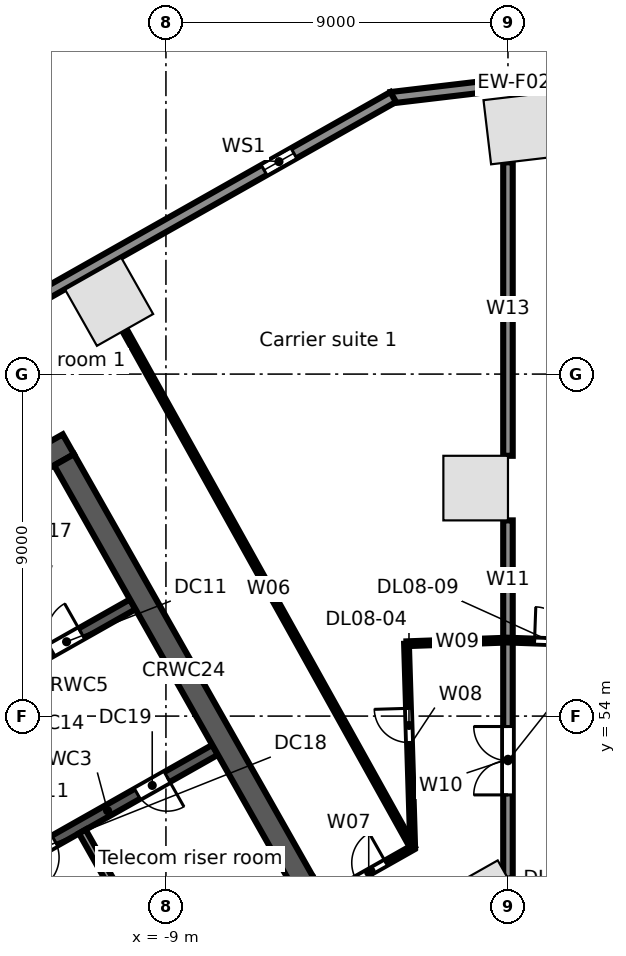
"""IFC4 building model, lengths in metres.
Left out: names, types, materials, properties, quantities, classifications, styles, units other than length and angle.
Written with IfcOpenShell. Run it as: python <this file> out.ifc"""

import sys

from ifc_helpers import new_model, si_unit, direction, frame, frame_2d, origin, origin_2d, place, context, subcontext, project, spatial, rectangle, extrude, element, fill, save


model = new_model("IFC4")
c1 = context("Model", 3, precision=1e-05, world=origin(), true_north=direction((0.0, 1.0)))
c2 = subcontext(c1, "Body", "Model", "MODEL_VIEW")
j1 = project(units=[si_unit("LENGTHUNIT", "METRE"), si_unit("PLANEANGLEUNIT", "RADIAN")], contexts=[c1])
p1 = place(None, origin())
s1 = spatial("IfcSite", under=j1, at=p1, CompositionType="ELEMENT")
p2 = place(p1, origin())
s2 = spatial("IfcBuilding", under=s1, at=p2, CompositionType="ELEMENT")
p3 = place(p2, frame((0.0, 0.0, 51.5)))
s3 = spatial("IfcBuildingStorey", under=s2, at=p3, CompositionType="ELEMENT", Elevation=51.5)
for number, where, z_axis, x_axis in (
    (1, (0.3, 69.464, 0.0), (0.0, 0.0, 1.0), (-0.993, -0.118, 0.0)),
    (2, (-10.495, 64.902, 0.0), (0.0, 0.0, 1.0), (-0.87, -0.492, 0.0)),
    (3, (-0.591, 49.044, 0.0), (0.0, 0.0, 1.0), (0.87, 0.492, 0.0)),
    (4, (-0.85, 60.0, 0.0), (0.0, 0.0, 1.0), (0.0, 1.0, 0.0)),
):
    element("IfcColumn", number, at=place(p3, frame(where, z_axis=z_axis, x_axis=x_axis)), inside=s3, PredefinedType="COLUMN", context=c2, shape_type="SweptSolid", body=[
        extrude(rectangle(XDim=1.7, YDim=1.7, at=origin_2d()), origin(), (0.0, 0.0, 1.0), 5.0),
    ])
p4 = place(p3, frame((-3.076, 70.273, 0.0), z_axis=(0.0, 0.0, 1.0), x_axis=(0.993067743007, 0.117543429416, 0.0)))
e5 = element("IfcWall", 5, at=p4, inside=s3, PredefinedType="STANDARD", context=c2, shape_type="SweptSolid", body=[
    extrude(rectangle(XDim=6.516, YDim=0.3, at=frame_2d((3.258, 0.0))), origin(), (0.0, 0.0, 1.0), 4.68),
])
p5 = place(p3, frame((-58.745, 38.764, 0.0), z_axis=(0.0, 0.0, 1.0), x_axis=(0.870355811726, 0.492423355453, 0.0)))
e6 = element("IfcWall", 6, at=p5, inside=s3, PredefinedType="STANDARD", context=c2, shape_type="SweptSolid", body=[
    extrude(rectangle(XDim=64.025, YDim=0.3, at=frame_2d((32.013, 0.0))), origin(), (0.0, 0.0, 1.0), 4.68),
])
p6 = place(p5, frame((60.122, 0.0, 0.6)))
e7 = element("IfcOpeningElement", 7, at=p6, cuts=e6, PredefinedType="OPENING", context=c2, shape_type="SweptSolid", body=[
    extrude(rectangle(XDim=0.9, YDim=3.2, at=frame_2d((0.45, 1.6))), frame((0.0, 0.16, 0.0), z_axis=(0.0, -1.0, 0.0), x_axis=(1.0, 0.0, 0.0)), (0.0, 0.0, 1.0), 0.32),
])
p7 = place(p5, frame((50.992, 0.0, 0.6)))
e8 = element("IfcOpeningElement", 8, at=p7, cuts=e6, PredefinedType="OPENING", context=c2, shape_type="SweptSolid", body=[
    extrude(rectangle(XDim=0.9, YDim=3.2, at=frame_2d((0.45, 1.6))), frame((0.0, 0.16, 0.0), z_axis=(0.0, -1.0, 0.0), x_axis=(1.0, 0.0, 0.0)), (0.0, 0.0, 1.0), 0.32),
])
p8 = place(p5, frame((41.862, 0.0, 0.6)))
e9 = element("IfcOpeningElement", 9, at=p8, cuts=e6, PredefinedType="OPENING", context=c2, shape_type="SweptSolid", body=[
    extrude(rectangle(XDim=0.9, YDim=3.2, at=frame_2d((0.45, 1.6))), frame((0.0, 0.16, 0.0), z_axis=(0.0, -1.0, 0.0), x_axis=(1.0, 0.0, 0.0)), (0.0, 0.0, 1.0), 0.32),
])
p9 = place(p5, frame((32.732, 0.0, 0.6)))
e10 = element("IfcOpeningElement", 10, at=p9, cuts=e6, PredefinedType="OPENING", context=c2, shape_type="SweptSolid", body=[
    extrude(rectangle(XDim=0.9, YDim=3.2, at=frame_2d((0.45, 1.6))), frame((0.0, 0.16, 0.0), z_axis=(0.0, -1.0, 0.0), x_axis=(1.0, 0.0, 0.0)), (0.0, 0.0, 1.0), 0.32),
])
p10 = place(p5, frame((23.602, 0.0, 0.6)))
e11 = element("IfcOpeningElement", 11, at=p10, cuts=e6, PredefinedType="OPENING", context=c2, shape_type="SweptSolid", body=[
    extrude(rectangle(XDim=0.9, YDim=3.2, at=frame_2d((0.45, 1.6))), frame((0.0, 0.16, 0.0), z_axis=(0.0, -1.0, 0.0), x_axis=(1.0, 0.0, 0.0)), (0.0, 0.0, 1.0), 0.32),
])
p11 = place(p5, frame((14.472, 0.0, 0.6)))
e12 = element("IfcOpeningElement", 12, at=p11, cuts=e6, PredefinedType="OPENING", context=c2, shape_type="SweptSolid", body=[
    extrude(rectangle(XDim=0.9, YDim=3.2, at=frame_2d((0.45, 1.6))), frame((0.0, 0.16, 0.0), z_axis=(0.0, -1.0, 0.0), x_axis=(1.0, 0.0, 0.0)), (0.0, 0.0, 1.0), 0.32),
])
p12 = place(p5, frame((5.342, 0.0, 0.6)))
e13 = element("IfcOpeningElement", 13, at=p12, cuts=e6, PredefinedType="OPENING", context=c2, shape_type="SweptSolid", body=[
    extrude(rectangle(XDim=0.9, YDim=3.2, at=frame_2d((0.45, 1.6))), frame((0.0, 0.16, 0.0), z_axis=(0.0, -1.0, 0.0), x_axis=(1.0, 0.0, 0.0)), (0.0, 0.0, 1.0), 0.32),
])
p13 = place(p3, frame((-13.365, 49.911, 0.0), z_axis=(0.0, 0.0, 1.0), x_axis=(0.870340995471, 0.49244954219, 0.0)))
e14 = element("IfcWall", 14, at=p13, inside=s3, PredefinedType="SOLIDWALL", context=c2, shape_type="SweptSolid", body=[
    extrude(rectangle(XDim=6.5, YDim=0.3, at=frame_2d((3.25, 0.0))), origin(), (0.0, 0.0, 1.0), 4.68),
])
p14 = place(p13, frame((0.75, 0.0, 0.0)))
e15 = element("IfcOpeningElement", 15, at=p14, cuts=e14, PredefinedType="OPENING", context=c2, shape_type="SweptSolid", body=[
    extrude(rectangle(XDim=0.9, YDim=2.1, at=frame_2d((0.45, 1.05))), frame((0.0, 0.16, 0.0), z_axis=(0.0, -1.0, 0.0), x_axis=(1.0, 0.0, 0.0)), (0.0, 0.0, 1.0), 0.32),
])
p15 = place(p13, frame((4.15, 0.0, 0.0)))
e16 = element("IfcOpeningElement", 16, at=p15, cuts=e14, PredefinedType="OPENING", context=c2, shape_type="SweptSolid", body=[
    extrude(rectangle(XDim=0.9, YDim=2.1, at=frame_2d((0.45, 1.05))), frame((0.0, 0.16, 0.0), z_axis=(0.0, -1.0, 0.0), x_axis=(1.0, 0.0, 0.0)), (0.0, 0.0, 1.0), 0.32),
])
p16 = place(p3, frame((-15.618, 53.691, 0.0), z_axis=(0.0, 0.0, 1.0), x_axis=(0.870356769198, 0.492421663121, 0.0)))
e17 = element("IfcWall", 17, at=p16, inside=s3, PredefinedType="SOLIDWALL", context=c2, shape_type="SweptSolid", body=[
    extrude(rectangle(XDim=6.6, YDim=0.3, at=frame_2d((3.3, 0.0))), origin(), (0.0, 0.0, 1.0), 4.68),
])
p17 = place(p16, frame((0.7, 0.0, 0.0)))
e18 = element("IfcOpeningElement", 18, at=p17, cuts=e17, PredefinedType="OPENING", context=c2, shape_type="SweptSolid", body=[
    extrude(rectangle(XDim=0.9, YDim=2.1, at=frame_2d((0.45, 1.05))), frame((0.0, 0.16, 0.0), z_axis=(0.0, -1.0, 0.0), x_axis=(1.0, 0.0, 0.0)), (0.0, 0.0, 1.0), 0.32),
])
p18 = place(p16, frame((4.15, 0.0, 0.0)))
e19 = element("IfcOpeningElement", 19, at=p18, cuts=e17, PredefinedType="OPENING", context=c2, shape_type="SweptSolid", body=[
    extrude(rectangle(XDim=0.9, YDim=2.1, at=frame_2d((0.45, 1.05))), frame((0.0, 0.16, 0.0), z_axis=(0.0, -1.0, 0.0), x_axis=(1.0, 0.0, 0.0)), (0.0, 0.0, 1.0), 0.32),
])
p19 = place(p3, frame((-24.623, 53.767, 0.0), z_axis=(0.0, 0.0, 1.0), x_axis=(0.870356627484, 0.492421913601, 0.0)))
e20 = element("IfcWall", 20, at=p19, inside=s3, PredefinedType="SOLIDWALL", context=c2, shape_type="SweptSolid", body=[
    extrude(rectangle(XDim=15.0, YDim=0.6, at=frame_2d((7.5, 0.0))), origin(), (0.0, 0.0, 1.0), 4.68),
])
p20 = place(p3, frame((-13.291, 49.781, 0.0), z_axis=(0.0, 0.0, 1.0), x_axis=(0.492394910396, -0.870371904542, 0.0)))
e21 = element("IfcWall", 21, at=p20, inside=s3, PredefinedType="SOLIDWALL", context=c2, shape_type="SweptSolid", body=[
    extrude(rectangle(XDim=4.05, YDim=0.3, at=frame_2d((2.025, 0.0))), origin(), (0.0, 0.0, 1.0), 4.68),
])
p21 = place(p3, frame((-11.202, 50.962, 0.0), z_axis=(0.0, 0.0, 1.0), x_axis=(0.49241474071, -0.870360685654, 0.0)))
e22 = element("IfcWall", 22, at=p21, inside=s3, PredefinedType="PARTITIONING", context=c2, shape_type="SweptSolid", body=[
    extrude(rectangle(XDim=4.05, YDim=0.2, at=frame_2d((2.025, 0.0))), origin(), (0.0, 0.0, 1.0), 4.68),
])
p22 = place(p3, frame((-11.681, 60.744, 0.0), z_axis=(0.0, 0.0, 1.0), x_axis=(0.492426772896, -0.870353878221, 0.0)))
e23 = element("IfcWall", 23, at=p22, inside=s3, PredefinedType="SOLIDWALL", context=c2, shape_type="SweptSolid", body=[
    extrude(rectangle(XDim=12.8, YDim=0.6, at=frame_2d((6.4, 0.0))), origin(), (0.0, 0.0, 1.0), 4.68),
])
p23 = place(p3, frame((-10.088, 64.155, 0.0), z_axis=(0.0, 0.0, 1.0), x_axis=(0.486446127767, -0.873710572661, 0.0)))
e24 = element("IfcWall", 24, at=p23, inside=s3, PredefinedType="PARTITIONING", context=c2, shape_type="SweptSolid", body=[
    extrude(rectangle(XDim=15.584, YDim=0.125, at=frame_2d((7.792, 0.0))), origin(), (0.0, 0.0, 1.0), 3.76),
])
p24 = place(p3, frame((-4.821, 49.23, 0.0), z_axis=(0.0, 0.0, 1.0), x_axis=(0.870371217631, 0.492396124598, 0.0)))
e25 = element("IfcWall", 25, at=p24, inside=s3, PredefinedType="PARTITIONING", context=c2, shape_type="SweptSolid", body=[
    extrude(rectangle(XDim=2.659, YDim=0.125, at=frame_2d((1.329, 0.0))), origin(), (0.0, 0.0, 1.0), 4.68),
])
p25 = place(p24, frame((0.95, 0.0, 0.0)))
e26 = element("IfcOpeningElement", 26, at=p25, cuts=e25, PredefinedType="OPENING", context=c2, shape_type="SweptSolid", body=[
    extrude(rectangle(XDim=0.9, YDim=2.1, at=frame_2d((0.45, 1.05))), frame((0.0, 0.073, 0.0), z_axis=(0.0, -1.0, 0.0), x_axis=(1.0, 0.0, 0.0)), (0.0, 0.0, 1.0), 0.145),
])
p26 = place(p3, frame((-2.67, 55.904, 0.0), z_axis=(0.0, 0.0, 1.0), x_axis=(0.030338701418, -0.999539675649, 0.0)))
e27 = element("IfcWall", 27, at=p26, inside=s3, PredefinedType="PARTITIONING", context=c2, shape_type="SweptSolid", body=[
    extrude(rectangle(XDim=5.367, YDim=0.125, at=frame_2d((2.684, 0.0))), origin(), (0.0, 0.0, 1.0), 4.68),
])
p27 = place(p26, frame((1.7, 0.0, 0.0)))
e28 = element("IfcOpeningElement", 28, at=p27, cuts=e27, PredefinedType="OPENING", context=c2, shape_type="SweptSolid", body=[
    extrude(rectangle(XDim=0.9, YDim=2.1, at=frame_2d((0.45, 1.05))), frame((0.0, 0.073, 0.0), z_axis=(0.0, -1.0, 0.0), x_axis=(1.0, 0.0, 0.0)), (0.0, 0.0, 1.0), 0.145),
])
p28 = place(p3, frame((-2.67, 55.904, 0.0), z_axis=(0.0, 0.0, 1.0), x_axis=(0.999354913865, 0.03591317494, 0.0)))
e29 = element("IfcWall", 29, at=p28, inside=s3, PredefinedType="PARTITIONING", context=c2, shape_type="SweptSolid", body=[
    extrude(rectangle(XDim=2.672, YDim=0.125, at=frame_2d((1.336, 0.0))), origin(), (0.0, 0.0, 1.0), 3.742),
])
p29 = place(p3, frame((0.0, 49.726, 0.0), z_axis=(0.0, 0.0, 1.0), x_axis=(0.0, 1.0, 0.0)))
e30 = element("IfcWall", 30, at=p29, inside=s3, PredefinedType="PARTITIONING", context=c2, shape_type="SweptSolid", body=[
    extrude(rectangle(XDim=6.274, YDim=0.25, at=frame_2d((3.137, 0.0))), origin(), (0.0, 0.0, 1.0), 4.68),
])
p30 = place(p29, frame((2.2, 0.0, 0.0)))
e31 = element("IfcOpeningElement", 31, at=p30, cuts=e30, PredefinedType="OPENING", context=c2, shape_type="SweptSolid", body=[
    extrude(rectangle(XDim=1.8, YDim=2.1, at=frame_2d((0.9, 1.05))), frame((0.0, 0.135, 0.0), z_axis=(0.0, -1.0, 0.0), x_axis=(1.0, 0.0, 0.0)), (0.0, 0.0, 1.0), 0.27),
])
p31 = place(p3, frame((0.0, 56.0, 0.0), z_axis=(0.0, 0.0, 1.0), x_axis=(0.0, 1.0, 0.0)))
e32 = element("IfcWall", 32, at=p31, inside=s3, PredefinedType="PARTITIONING", context=c2, shape_type="SweptSolid", body=[
    extrude(rectangle(XDim=3.15, YDim=0.25, at=frame_2d((1.575, 0.0))), origin(), (0.0, 0.0, 1.0), 4.68),
])
p32 = place(p3, frame((0.0, 56.0, 0.0), z_axis=(0.0, 0.0, 1.0), x_axis=(0.999349313684, -0.036068673934, 0.0)))
e33 = element("IfcWall", 33, at=p32, inside=s3, PredefinedType="PARTITIONING", context=c2, shape_type="SweptSolid", body=[
    extrude(rectangle(XDim=2.471, YDim=0.125, at=frame_2d((1.235, 0.0))), origin(), (0.0, 0.0, 1.0), 4.68),
])
p33 = place(p32, frame((0.7, 0.0, 0.0)))
e34 = element("IfcOpeningElement", 34, at=p33, cuts=e33, PredefinedType="OPENING", context=c2, shape_type="SweptSolid", body=[
    extrude(rectangle(XDim=0.9, YDim=2.1, at=frame_2d((0.45, 1.05))), frame((0.0, 0.073, 0.0), z_axis=(0.0, -1.0, 0.0), x_axis=(1.0, 0.0, 0.0)), (0.0, 0.0, 1.0), 0.145),
])
p34 = place(p3, frame((0.0, 60.85, 0.0), z_axis=(0.0, 0.0, 1.0), x_axis=(0.0, 1.0, 0.0)))
e35 = element("IfcWall", 35, at=p34, inside=s3, PredefinedType="PARTITIONING", context=c2, shape_type="SweptSolid", body=[
    extrude(rectangle(XDim=7.723, YDim=0.25, at=frame_2d((3.861, 0.0))), origin(), (0.0, 0.0, 1.0), 3.952),
])
p35 = place(p6, origin())
e36 = element("IfcWindow", 36, at=p35, inside=s3, PartitioningType="SINGLE_PANEL", PredefinedType="WINDOW", context=c2, shape_type="SweptSolid", body=[
    extrude(rectangle(XDim=0.9, YDim=3.2, at=frame_2d((0.45, 1.6))), frame((0.0, 0.03, 0.0), z_axis=(0.0, -1.0, 0.0), x_axis=(1.0, 0.0, 0.0)), (0.0, 0.0, 1.0), 0.06),
])
fill(e7, e36)
p36 = place(p18, origin())
e37 = element("IfcDoor", 37, at=p36, inside=s3, OperationType="SINGLE_SWING_RIGHT", PredefinedType="DOOR", context=c2, shape_type="SweptSolid", body=[
    extrude(rectangle(XDim=0.9, YDim=2.1, at=frame_2d((0.45, 1.05))), frame((0.0, 0.025, 0.0), z_axis=(0.0, -1.0, 0.0), x_axis=(1.0, 0.0, 0.0)), (0.0, 0.0, 1.0), 0.05),
])
fill(e19, e37)
p37 = place(p14, frame((0.9, 0.0, 0.0), z_axis=(0.0, 0.0, 1.0), x_axis=(-1.0, 0.0, 0.0)))
e38 = element("IfcDoor", 38, at=p37, inside=s3, OperationType="SINGLE_SWING_RIGHT", PredefinedType="DOOR", context=c2, shape_type="SweptSolid", body=[
    extrude(rectangle(XDim=0.9, YDim=2.1, at=frame_2d((0.45, 1.05))), frame((0.0, 0.025, 0.0), z_axis=(0.0, -1.0, 0.0), x_axis=(1.0, 0.0, 0.0)), (0.0, 0.0, 1.0), 0.05),
])
fill(e15, e38)
p38 = place(p15, frame((0.9, 0.0, 0.0), z_axis=(0.0, 0.0, 1.0), x_axis=(-1.0, 0.0, 0.0)))
e39 = element("IfcDoor", 39, at=p38, inside=s3, OperationType="SINGLE_SWING_LEFT", PredefinedType="DOOR", context=c2, shape_type="SweptSolid", body=[
    extrude(rectangle(XDim=0.9, YDim=2.1, at=frame_2d((0.45, 1.05))), frame((0.0, 0.025, 0.0), z_axis=(0.0, -1.0, 0.0), x_axis=(1.0, 0.0, 0.0)), (0.0, 0.0, 1.0), 0.05),
])
fill(e16, e39)
p39 = place(p25, origin())
e40 = element("IfcDoor", 40, at=p39, inside=s3, OperationType="SINGLE_SWING_RIGHT", PredefinedType="DOOR", context=c2, shape_type="SweptSolid", body=[
    extrude(rectangle(XDim=0.9, YDim=2.1, at=frame_2d((0.45, 1.05))), frame((0.0, 0.025, 0.0), z_axis=(0.0, -1.0, 0.0), x_axis=(1.0, 0.0, 0.0)), (0.0, 0.0, 1.0), 0.05),
])
fill(e26, e40)
p40 = place(p27, frame((0.9, 0.0, 0.0), z_axis=(0.0, 0.0, 1.0), x_axis=(-1.0, 0.0, 0.0)))
e41 = element("IfcDoor", 41, at=p40, inside=s3, OperationType="SINGLE_SWING_RIGHT", PredefinedType="DOOR", context=c2, shape_type="SweptSolid", body=[
    extrude(rectangle(XDim=0.9, YDim=2.1, at=frame_2d((0.45, 1.05))), frame((0.0, 0.025, 0.0), z_axis=(0.0, -1.0, 0.0), x_axis=(1.0, 0.0, 0.0)), (0.0, 0.0, 1.0), 0.05),
])
fill(e28, e41)
p41 = place(p33, origin())
e42 = element("IfcDoor", 42, at=p41, inside=s3, OperationType="SINGLE_SWING_LEFT", PredefinedType="DOOR", context=c2, shape_type="SweptSolid", body=[
    extrude(rectangle(XDim=0.9, YDim=2.1, at=frame_2d((0.45, 1.05))), frame((0.0, 0.025, 0.0), z_axis=(0.0, -1.0, 0.0), x_axis=(1.0, 0.0, 0.0)), (0.0, 0.0, 1.0), 0.05),
])
fill(e34, e42)
p42 = place(p30, origin())
e43 = element("IfcDoor", 43, at=p42, inside=s3, OperationType="DOUBLE_DOOR_SINGLE_SWING", PredefinedType="DOOR", context=c2, shape_type="SweptSolid", body=[
    extrude(rectangle(XDim=1.8, YDim=2.1, at=frame_2d((0.9, 1.05))), frame((0.0, 0.025, 0.0), z_axis=(0.0, -1.0, 0.0), x_axis=(1.0, 0.0, 0.0)), (0.0, 0.0, 1.0), 0.05),
])
fill(e31, e43)
save(model, sys.argv[1])
